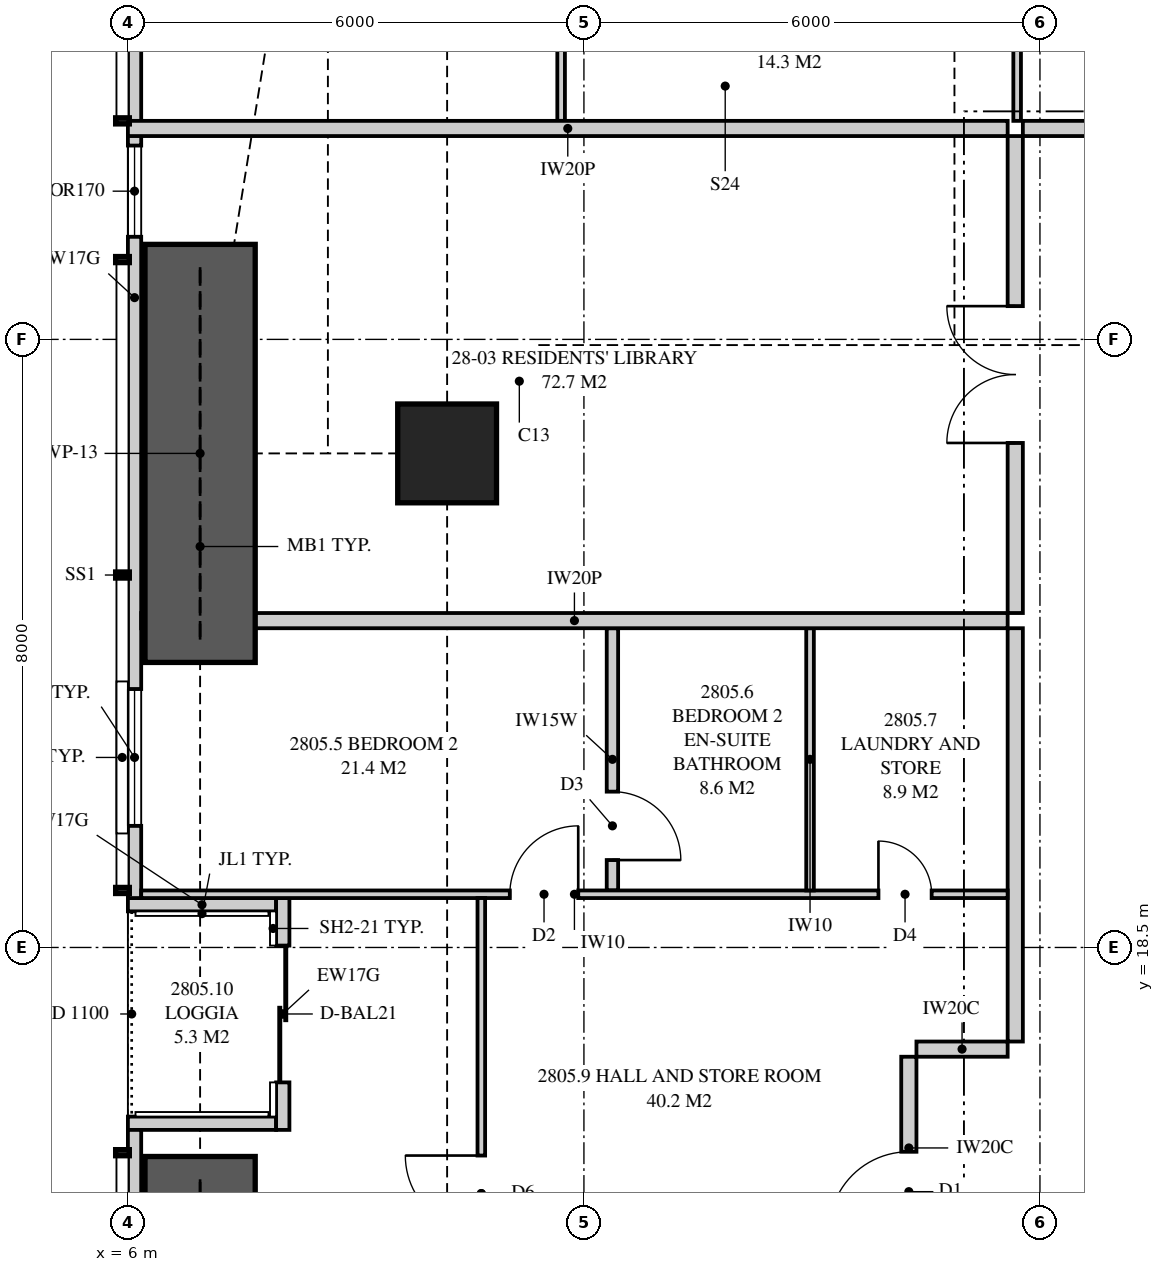
"""IFC4 building model, lengths in metres.
Left out: names, types, materials, properties, quantities, classifications, styles, units other than length and angle.
Written with IfcOpenShell. Run it as: python <this file> out.ifc"""

import sys

from ifc_helpers import new_model, si_unit, direction, frame, frame_2d, origin, origin_2d, place, context, subcontext, project, spatial, polyline, rectangle, outline, extrude, element, fill, save


model = new_model("IFC4")
c1 = context("Model", 3, precision=1e-05, world=origin(), true_north=direction((0.0, 1.0)))
c2 = subcontext(c1, "Body", "Model", "MODEL_VIEW")
j1 = project(units=[si_unit("LENGTHUNIT", "METRE"), si_unit("PLANEANGLEUNIT", "RADIAN")], contexts=[c1])
p1 = place(None, origin())
s1 = spatial("IfcSite", under=j1, at=p1, CompositionType="ELEMENT")
p2 = place(p1, origin())
s2 = spatial("IfcBuilding", under=s1, at=p2, CompositionType="ELEMENT")
p3 = place(p2, frame((0.0, 0.0, 104.85)))
s3 = spatial("IfcBuildingStorey", under=s2, at=p3, CompositionType="ELEMENT", Elevation=104.85)
p4 = place(p3, frame((10.2, 25.0, 0.0), z_axis=(0.0, 0.0, 1.0), x_axis=(1.0, 0.0, 0.0)))
e1 = element("IfcColumn", 1, at=p4, inside=s3, PredefinedType="COLUMN", context=c2, shape_type="SweptSolid", body=[
    extrude(rectangle(XDim=1.3, YDim=1.3, at=origin_2d()), origin(), (0.0, 0.0, 1.0), 3.35),
])
p5 = place(p3, frame((6.087, 34.949, 0.0), z_axis=(0.0, 0.0, 1.0), x_axis=(0.0, -1.0, 0.0)))
e2 = element("IfcWall", 2, at=p5, inside=s3, PredefinedType="SOLIDWALL", context=c2, shape_type="SweptSolid", body=[
    extrude(outline(polyline([(0.0, 0.0), (15.799, 0.0), (15.799, 2.15), (9.949, 2.15), (9.949, 3.11), (9.823, 3.11), (9.823, 2.15), (9.73, 2.15), (9.73, 3.11), (0.0, 3.11), (0.0, 0.0)])), frame((0.0, 0.087, 0.0), z_axis=(0.0, -1.0, 0.0), x_axis=(1.0, 0.0, 0.0)), (0.0, 0.0, 1.0), 0.175),
])
p6 = place(p5, frame((2.724, 0.0, 0.4)))
e3 = element("IfcOpeningElement", 3, at=p6, cuts=e2, PredefinedType="OPENING", context=c2, shape_type="SweptSolid", body=[
    extrude(rectangle(XDim=1.8, YDim=1.7, at=frame_2d((0.9, 0.85))), frame((0.0, 0.097, 0.0), z_axis=(0.0, -1.0, 0.0), x_axis=(1.0, 0.0, 0.0)), (0.0, 0.0, 1.0), 0.195),
])
p7 = place(p5, frame((5.899, 0.0, 0.4)))
e4 = element("IfcOpeningElement", 4, at=p7, cuts=e2, PredefinedType="OPENING", context=c2, shape_type="SweptSolid", body=[
    extrude(rectangle(XDim=1.2, YDim=1.7, at=frame_2d((0.6, 0.85))), frame((0.0, 0.097, 0.0), z_axis=(0.0, -1.0, 0.0), x_axis=(1.0, 0.0, 0.0)), (0.0, 0.0, 1.0), 0.195),
])
p8 = place(p5, frame((13.049, 0.0, 0.4)))
e5 = element("IfcOpeningElement", 5, at=p8, cuts=e2, PredefinedType="OPENING", context=c2, shape_type="SweptSolid", body=[
    extrude(rectangle(XDim=1.8, YDim=1.7, at=frame_2d((0.9, 0.85))), frame((0.0, 0.097, 0.0), z_axis=(0.0, -1.0, 0.0), x_axis=(1.0, 0.0, 0.0)), (0.0, 0.0, 1.0), 0.195),
])
p9 = place(p3, frame((6.087, 16.1, 0.0), z_axis=(0.0, 0.0, 1.0), x_axis=(0.0, -1.0, 0.0)))
e6 = element("IfcWall", 6, at=p9, inside=s3, PredefinedType="SOLIDWALL", context=c2, shape_type="SweptSolid", body=[
    extrude(outline(polyline([(0.0, 0.0), (13.049, 0.0), (13.049, 3.11), (3.319, 3.11), (3.319, 2.15), (3.226, 2.15), (3.226, 3.11), (3.1, 3.11), (3.1, 2.15), (0.0, 2.15), (0.0, 0.0)])), frame((0.0, 0.087, 0.0), z_axis=(0.0, -1.0, 0.0), x_axis=(1.0, 0.0, 0.0)), (0.0, 0.0, 1.0), 0.175),
])
p10 = place(p9, frame((5.975, 0.0, 0.4)))
e7 = element("IfcOpeningElement", 7, at=p10, cuts=e6, PredefinedType="OPENING", context=c2, shape_type="SweptSolid", body=[
    extrude(rectangle(XDim=1.8, YDim=1.7, at=frame_2d((0.9, 0.85))), frame((0.0, 0.097, 0.0), z_axis=(0.0, -1.0, 0.0), x_axis=(1.0, 0.0, 0.0)), (0.0, 0.0, 1.0), 0.195),
])
p11 = place(p9, frame((9.025, 0.0, 0.4)))
e8 = element("IfcOpeningElement", 8, at=p11, cuts=e6, PredefinedType="OPENING", context=c2, shape_type="SweptSolid", body=[
    extrude(rectangle(XDim=1.8, YDim=1.7, at=frame_2d((0.9, 0.85))), frame((0.0, 0.097, 0.0), z_axis=(0.0, -1.0, 0.0), x_axis=(1.0, 0.0, 0.0)), (0.0, 0.0, 1.0), 0.195),
])
p12 = place(p3, frame((8.038, 19.15, 0.0), z_axis=(0.0, 0.0, 1.0), x_axis=(0.0, -1.0, 0.0)))
e9 = element("IfcWall", 9, at=p12, inside=s3, PredefinedType="SOLIDWALL", context=c2, shape_type="SweptSolid", body=[
    extrude(rectangle(XDim=3.05, YDim=0.175, at=frame_2d((1.525, 0.0))), origin(), (0.0, 0.0, 1.0), 3.11),
])
p13 = place(p12, frame((0.625, 0.0, 0.0)))
e10 = element("IfcOpeningElement", 10, at=p13, cuts=e9, PredefinedType="OPENING", context=c2, shape_type="SweptSolid", body=[
    extrude(rectangle(XDim=1.8, YDim=2.1, at=frame_2d((0.9, 1.05))), frame((0.0, 0.097, 0.0), z_axis=(0.0, -1.0, 0.0), x_axis=(1.0, 0.0, 0.0)), (0.0, 0.0, 1.0), 0.195),
])
for number, where, z_axis, x_axis in (
    (11, (6.0, 19.062, 0.0), (0.0, 0.0, 1.0), (1.0, 0.0, 0.0)),
    (12, (6.0, 16.188, 0.0), (0.0, 0.0, 1.0), (1.0, 0.0, 0.0)),
):
    element("IfcWall", number, at=place(p3, frame(where, z_axis=z_axis, x_axis=x_axis)), inside=s3, PredefinedType="SOLIDWALL", context=c2, shape_type="SweptSolid", body=[
        extrude(outline(polyline([(0.0, 0.0), (1.95, 0.0), (1.95, 3.11), (1.75, 3.11), (1.75, 2.15), (0.15, 2.15), (0.15, 3.11), (0.0, 3.11), (0.0, 0.0)])), frame((0.0, 0.087, 0.0), z_axis=(0.0, -1.0, 0.0), x_axis=(1.0, 0.0, 0.0)), (0.0, 0.0, 1.0), 0.175),
    ])
p14 = place(p3, frame((17.775, 29.275, 0.0), z_axis=(0.0, 0.0, 1.0), x_axis=(1.0, 0.0, 0.0)))
e13 = element("IfcWall", 13, at=p14, inside=s3, PredefinedType="PARTITIONING", context=c2, shape_type="SweptSolid", body=[
    extrude(rectangle(XDim=9.188, YDim=0.2, at=frame_2d((4.594, 0.0))), origin(), (0.0, 0.0, 1.0), 3.11),
])
p15 = place(p14, frame((5.05, 0.0, 0.0)))
e14 = element("IfcOpeningElement", 14, at=p15, cuts=e13, PredefinedType="OPENING", context=c2, shape_type="SweptSolid", body=[
    extrude(rectangle(XDim=1.05, YDim=2.2, at=frame_2d((0.525, 1.1))), frame((0.0, 0.11, 0.0), z_axis=(0.0, -1.0, 0.0), x_axis=(1.0, 0.0, 0.0)), (0.0, 0.0, 1.0), 0.22),
])
p16 = place(p3, frame((11.7, 37.825, 0.0), z_axis=(0.0, 0.0, 1.0), x_axis=(0.0, -1.0, 0.0)))
e15 = element("IfcWall", 15, at=p16, inside=s3, PredefinedType="PARTITIONING", context=c2, shape_type="SweptSolid", body=[
    extrude(outline(polyline([(0.0, 0.0), (8.45, 0.0), (8.45, 3.11), (2.708, 3.11), (2.708, 2.15), (0.953, 2.15), (0.953, 3.11), (0.0, 3.11), (0.0, 0.0)])), frame((0.0, 0.05, 0.0), z_axis=(0.0, -1.0, 0.0), x_axis=(1.0, 0.0, 0.0)), (0.0, 0.0, 1.0), 0.1),
])
p17 = place(p16, frame((2.701, 0.0, 0.0)))
e16 = element("IfcOpeningElement", 16, at=p17, cuts=e15, PredefinedType="OPENING", context=c2, shape_type="SweptSolid", body=[
    extrude(rectangle(XDim=0.9, YDim=2.1, at=frame_2d((0.45, 1.05))), frame((0.0, 0.06, 0.0), z_axis=(0.0, -1.0, 0.0), x_axis=(1.0, 0.0, 0.0)), (0.0, 0.0, 1.0), 0.12),
])
p18 = place(p16, frame((6.025, 0.0, 0.0)))
e17 = element("IfcOpeningElement", 17, at=p18, cuts=e15, PredefinedType="OPENING", context=c2, shape_type="SweptSolid", body=[
    extrude(rectangle(XDim=0.9, YDim=2.1, at=frame_2d((0.45, 1.05))), frame((0.0, 0.06, 0.0), z_axis=(0.0, -1.0, 0.0), x_axis=(1.0, 0.0, 0.0)), (0.0, 0.0, 1.0), 0.12),
])
p19 = place(p3, frame((17.7, 37.825, 0.0), z_axis=(0.0, 0.0, 1.0), x_axis=(0.0, -1.0, 0.0)))
e18 = element("IfcWall", 18, at=p19, inside=s3, PredefinedType="PARTITIONING", context=c2, shape_type="SweptSolid", body=[
    extrude(outline(polyline([(1.635, 2.15), (0.0, 2.15), (0.0, 0.0), (8.45, 0.0), (8.45, 3.11), (1.635, 3.11), (1.635, 2.15)]), holes=[polyline([(1.021, 0.116), (0.529, 0.116), (0.529, 0.906), (1.021, 0.906), (1.021, 0.116)]), polyline([(1.021, 1.244), (0.529, 1.244), (0.529, 2.034), (1.021, 2.034), (1.021, 1.244)])]), frame((0.0, 0.05, 0.0), z_axis=(0.0, -1.0, 0.0), x_axis=(1.0, 0.0, 0.0)), (0.0, 0.0, 1.0), 0.1),
])
p20 = place(p19, frame((4.6, 0.0, 0.0)))
e19 = element("IfcOpeningElement", 19, at=p20, cuts=e18, PredefinedType="OPENING", context=c2, shape_type="SweptSolid", body=[
    extrude(rectangle(XDim=0.9, YDim=2.1, at=frame_2d((0.45, 1.05))), frame((0.0, 0.06, 0.0), z_axis=(0.0, -1.0, 0.0), x_axis=(1.0, 0.0, 0.0)), (0.0, 0.0, 1.0), 0.12),
])
p21 = place(p3, frame((6.0, 29.275, 0.0), z_axis=(0.0, 0.0, 1.0), x_axis=(1.0, 0.0, 0.0)))
e20 = element("IfcWall", 20, at=p21, inside=s3, PredefinedType="PARTITIONING", context=c2, shape_type="SweptSolid", body=[
    extrude(outline(polyline([(0.0, 0.0), (11.575, 0.0), (11.575, 3.11), (11.212, 3.11), (11.212, 2.541), (10.538, 2.541), (10.538, 3.11), (5.51, 3.11), (5.51, 2.51), (2.969, 2.51), (2.969, 2.541), (2.565, 2.541), (2.565, 2.15), (0.721, 2.15), (0.721, 3.11), (0.0, 3.11), (0.0, 0.0)])), frame((0.0, 0.1, 0.0), z_axis=(0.0, -1.0, 0.0), x_axis=(1.0, 0.0, 0.0)), (0.0, 0.0, 1.0), 0.2),
])
p22 = place(p3, frame((6.175, 22.8, 0.0), z_axis=(0.0, 0.0, 1.0), x_axis=(1.0, 0.0, 0.0)))
e21 = element("IfcWall", 21, at=p22, inside=s3, PredefinedType="PARTITIONING", context=c2, shape_type="SweptSolid", body=[
    extrude(outline(polyline([(0.0, 0.0), (11.4, 0.0), (11.4, 3.11), (5.335, 3.11), (5.335, 2.51), (2.715, 2.51), (2.715, 3.11), (1.685, 3.11), (1.685, 2.15), (0.0, 2.15), (0.0, 0.0)])), frame((0.0, 0.1, 0.0), z_axis=(0.0, -1.0, 0.0), x_axis=(1.0, 0.0, 0.0)), (0.0, 0.0, 1.0), 0.2),
])
p23 = place(p3, frame((6.175, 19.2, 0.0), z_axis=(0.0, 0.0, 1.0), x_axis=(1.0, 0.0, 0.0)))
e22 = element("IfcWall", 22, at=p23, inside=s3, PredefinedType="PARTITIONING", context=c2, shape_type="SweptSolid", body=[
    extrude(outline(polyline([(0.0, 0.0), (11.4, 0.0), (11.4, 3.11), (5.285, 3.11), (5.285, 2.51), (2.765, 2.51), (2.765, 3.11), (1.635, 3.11), (1.635, 2.15), (0.0, 2.15), (0.0, 3.11), (0.0, 0.0)])), frame((0.0, 0.05, 0.0), z_axis=(0.0, -1.0, 0.0), x_axis=(1.0, 0.0, 0.0)), (0.0, 0.0, 1.0), 0.1),
])
p24 = place(p23, frame((4.85, 0.0, 0.0)))
e23 = element("IfcOpeningElement", 23, at=p24, cuts=e22, PredefinedType="OPENING", context=c2, shape_type="SweptSolid", body=[
    extrude(rectangle(XDim=0.9, YDim=2.1, at=frame_2d((0.45, 1.05))), frame((0.0, 0.06, 0.0), z_axis=(0.0, -1.0, 0.0), x_axis=(1.0, 0.0, 0.0)), (0.0, 0.0, 1.0), 0.12),
])
p25 = place(p23, frame((9.7, 0.0, 0.0)))
e24 = element("IfcOpeningElement", 24, at=p25, cuts=e22, PredefinedType="OPENING", context=c2, shape_type="SweptSolid", body=[
    extrude(rectangle(XDim=0.7, YDim=2.1, at=frame_2d((0.35, 1.05))), frame((0.0, 0.06, 0.0), z_axis=(0.0, -1.0, 0.0), x_axis=(1.0, 0.0, 0.0)), (0.0, 0.0, 1.0), 0.12),
])
p26 = place(p3, frame((12.375, 19.25, 0.0), z_axis=(0.0, 0.0, 1.0), x_axis=(0.0, 1.0, 0.0)))
e25 = element("IfcWall", 25, at=p26, inside=s3, PredefinedType="PLUMBINGWALL", context=c2, shape_type="SweptSolid", body=[
    extrude(rectangle(XDim=3.45, YDim=0.15, at=frame_2d((1.725, 0.0))), origin(), (0.0, 0.0, 1.0), 3.11),
])
p27 = place(p26, frame((0.4, 0.0, 0.0)))
e26 = element("IfcOpeningElement", 26, at=p27, cuts=e25, PredefinedType="OPENING", context=c2, shape_type="SweptSolid", body=[
    extrude(rectangle(XDim=0.9, YDim=2.1, at=frame_2d((0.45, 1.05))), frame((0.0, 0.085, 0.0), z_axis=(0.0, -1.0, 0.0), x_axis=(1.0, 0.0, 0.0)), (0.0, 0.0, 1.0), 0.17),
])
p28 = place(p3, frame((14.975, 19.25, 0.0), z_axis=(0.0, 0.0, 1.0), x_axis=(0.0, 1.0, 0.0)))
e27 = element("IfcWall", 27, at=p28, inside=s3, PredefinedType="PARTITIONING", context=c2, shape_type="SweptSolid", body=[
    extrude(rectangle(XDim=3.45, YDim=0.1, at=frame_2d((1.725, 0.0))), origin(), (0.0, 0.0, 1.0), 3.11),
])
p29 = place(p3, frame((10.65, 11.375, 0.0), z_axis=(0.0, 0.0, 1.0), x_axis=(0.0, 1.0, 0.0)))
e28 = element("IfcWall", 28, at=p29, inside=s3, PredefinedType="PARTITIONING", context=c2, shape_type="SweptSolid", body=[
    extrude(outline(polyline([(0.0, 0.0), (7.775, 0.0), (7.775, 3.11), (7.775, 2.51), (1.685, 2.51), (0.0, 2.51), (0.0, 3.11), (0.0, 0.0)])), frame((0.0, 0.05, 0.0), z_axis=(0.0, -1.0, 0.0), x_axis=(1.0, 0.0, 0.0)), (0.0, 0.0, 1.0), 0.1),
])
p30 = place(p29, frame((3.387, 0.0, 0.0)))
e29 = element("IfcOpeningElement", 29, at=p30, cuts=e28, PredefinedType="OPENING", context=c2, shape_type="SweptSolid", body=[
    extrude(rectangle(XDim=1.0, YDim=2.1, at=frame_2d((0.5, 1.05))), frame((0.0, 0.06, 0.0), z_axis=(0.0, -1.0, 0.0), x_axis=(1.0, 0.0, 0.0)), (0.0, 0.0, 1.0), 0.12),
])
p31 = place(p3, frame((17.675, 22.9, 0.0), z_axis=(0.0, 0.0, 1.0), x_axis=(0.0, 1.0, 0.0)))
e30 = element("IfcWall", 30, at=p31, inside=s3, PredefinedType="PARTITIONING", context=c2, shape_type="SweptSolid", body=[
    extrude(outline(polyline([(0.0, 0.0), (6.275, 0.0), (6.275, 3.11), (3.862, 3.11), (3.862, 2.541), (3.188, 2.541), (3.188, 3.11), (0.0, 3.11), (0.0, 0.0)])), frame((0.0, 0.1, 0.0), z_axis=(0.0, -1.0, 0.0), x_axis=(1.0, 0.0, 0.0)), (0.0, 0.0, 1.0), 0.2),
])
p32 = place(p31, frame((2.238, 0.0, 0.0)))
e31 = element("IfcOpeningElement", 31, at=p32, cuts=e30, PredefinedType="OPENING", context=c2, shape_type="SweptSolid", body=[
    extrude(rectangle(XDim=1.8, YDim=2.1, at=frame_2d((0.9, 1.05))), frame((0.0, 0.11, 0.0), z_axis=(0.0, -1.0, 0.0), x_axis=(1.0, 0.0, 0.0)), (0.0, 0.0, 1.0), 0.22),
])
p33 = place(p3, frame((17.675, 17.262, 0.0), z_axis=(0.0, 0.0, 1.0), x_axis=(0.0, 1.0, 0.0)))
e32 = element("IfcWall", 32, at=p33, inside=s3, PredefinedType="PARTITIONING", context=c2, shape_type="SweptSolid", body=[
    extrude(rectangle(XDim=5.438, YDim=0.2, at=frame_2d((2.719, 0.0))), origin(), (0.0, 0.0, 1.0), 3.11),
])
p34 = place(p3, frame((16.275, 14.663, 0.0), z_axis=(0.0, 0.0, 1.0), x_axis=(0.0, 1.0, 0.0)))
e33 = element("IfcWall", 33, at=p34, inside=s3, PredefinedType="PARTITIONING", context=c2, shape_type="SweptSolid", body=[
    extrude(rectangle(XDim=2.4, YDim=0.2, at=frame_2d((1.2, 0.0))), origin(), (0.0, 0.0, 1.0), 3.11),
])
p35 = place(p34, frame((0.1, 0.0, 0.0)))
e34 = element("IfcOpeningElement", 34, at=p35, cuts=e33, PredefinedType="OPENING", context=c2, shape_type="SweptSolid", body=[
    extrude(rectangle(XDim=1.05, YDim=2.2, at=frame_2d((0.525, 1.1))), frame((0.0, 0.11, 0.0), z_axis=(0.0, -1.0, 0.0), x_axis=(1.0, 0.0, 0.0)), (0.0, 0.0, 1.0), 0.22),
])
p36 = place(p3, frame((17.575, 17.163, 0.0), z_axis=(0.0, 0.0, 1.0), x_axis=(-1.0, 0.0, 0.0)))
e35 = element("IfcWall", 35, at=p36, inside=s3, PredefinedType="PARTITIONING", context=c2, shape_type="SweptSolid", body=[
    extrude(rectangle(XDim=1.2, YDim=0.2, at=frame_2d((0.6, 0.0))), origin(), (0.0, 0.0, 1.0), 3.11),
])
for number, where, z_axis, x_axis in (
    (36, (6.95, 22.25, 0.0), (0.0, 0.0, 1.0), (0.0, 1.0, 0.0)),
    (37, (6.95, 10.25, 0.0), (0.0, 0.0, 1.0), (0.0, 1.0, 0.0)),
):
    element("IfcWall", number, at=place(p3, frame(where, z_axis=z_axis, x_axis=x_axis)), inside=s3, PredefinedType="SHEAR", context=c2, shape_type="SweptSolid", body=[
        extrude(rectangle(XDim=5.5, YDim=1.45, at=frame_2d((2.75, 0.0))), origin(), (0.0, 0.0, 1.0), 3.35),
    ])
p37 = place(p7, origin())
e38 = element("IfcWindow", 38, at=p37, inside=s3, PartitioningType="SINGLE_PANEL", PredefinedType="WINDOW", context=c2, shape_type="SweptSolid", body=[
    extrude(rectangle(XDim=1.2, YDim=1.7, at=frame_2d((0.6, 0.85))), frame((0.0, 0.03, 0.0), z_axis=(0.0, -1.0, 0.0), x_axis=(1.0, 0.0, 0.0)), (0.0, 0.0, 1.0), 0.06),
])
fill(e4, e38)
p38 = place(p8, origin())
e39 = element("IfcWindow", 39, at=p38, inside=s3, PartitioningType="SINGLE_PANEL", PredefinedType="WINDOW", context=c2, shape_type="SweptSolid", body=[
    extrude(rectangle(XDim=1.8, YDim=1.7, at=frame_2d((0.9, 0.85))), frame((0.0, 0.03, 0.0), z_axis=(0.0, -1.0, 0.0), x_axis=(1.0, 0.0, 0.0)), (0.0, 0.0, 1.0), 0.06),
])
fill(e5, e39)
p39 = place(p13, origin())
e40 = element("IfcDoor", 40, at=p39, inside=s3, OperationType="SLIDING_TO_LEFT", PredefinedType="DOOR", context=c2, shape_type="SweptSolid", body=[
    extrude(rectangle(XDim=1.8, YDim=2.1, at=frame_2d((0.9, 1.05))), frame((0.0, 0.025, 0.0), z_axis=(0.0, -1.0, 0.0), x_axis=(1.0, 0.0, 0.0)), (0.0, 0.0, 1.0), 0.05),
])
fill(e10, e40)
p40 = place(p35, origin())
e41 = element("IfcDoor", 41, at=p40, inside=s3, OperationType="SINGLE_SWING_LEFT", PredefinedType="DOOR", context=c2, shape_type="SweptSolid", body=[
    extrude(rectangle(XDim=1.05, YDim=2.2, at=frame_2d((0.525, 1.1))), frame((0.0, 0.025, 0.0), z_axis=(0.0, -1.0, 0.0), x_axis=(1.0, 0.0, 0.0)), (0.0, 0.0, 1.0), 0.05),
])
fill(e34, e41)
p41 = place(p24, origin())
e42 = element("IfcDoor", 42, at=p41, inside=s3, OperationType="SINGLE_SWING_RIGHT", PredefinedType="DOOR", context=c2, shape_type="SweptSolid", body=[
    extrude(rectangle(XDim=0.9, YDim=2.1, at=frame_2d((0.45, 1.05))), frame((0.0, 0.025, 0.0), z_axis=(0.0, -1.0, 0.0), x_axis=(1.0, 0.0, 0.0)), (0.0, 0.0, 1.0), 0.05),
])
fill(e23, e42)
p42 = place(p27, frame((0.9, 0.0, 0.0), z_axis=(0.0, 0.0, 1.0), x_axis=(-1.0, 0.0, 0.0)))
e43 = element("IfcDoor", 43, at=p42, inside=s3, OperationType="SINGLE_SWING_RIGHT", PredefinedType="DOOR", context=c2, shape_type="SweptSolid", body=[
    extrude(rectangle(XDim=0.9, YDim=2.1, at=frame_2d((0.45, 1.05))), frame((0.0, 0.025, 0.0), z_axis=(0.0, -1.0, 0.0), x_axis=(1.0, 0.0, 0.0)), (0.0, 0.0, 1.0), 0.05),
])
fill(e26, e43)
p43 = place(p25, origin())
e44 = element("IfcDoor", 44, at=p43, inside=s3, OperationType="SINGLE_SWING_LEFT", PredefinedType="DOOR", context=c2, shape_type="SweptSolid", body=[
    extrude(rectangle(XDim=0.7, YDim=2.1, at=frame_2d((0.35, 1.05))), frame((0.0, 0.025, 0.0), z_axis=(0.0, -1.0, 0.0), x_axis=(1.0, 0.0, 0.0)), (0.0, 0.0, 1.0), 0.05),
])
fill(e24, e44)
p44 = place(p30, origin())
e45 = element("IfcDoor", 45, at=p44, inside=s3, OperationType="SINGLE_SWING_RIGHT", PredefinedType="DOOR", context=c2, shape_type="SweptSolid", body=[
    extrude(rectangle(XDim=1.0, YDim=2.1, at=frame_2d((0.5, 1.05))), frame((0.0, 0.025, 0.0), z_axis=(0.0, -1.0, 0.0), x_axis=(1.0, 0.0, 0.0)), (0.0, 0.0, 1.0), 0.05),
])
fill(e29, e45)
p45 = place(p32, origin())
e46 = element("IfcDoor", 46, at=p45, inside=s3, OperationType="DOUBLE_DOOR_SINGLE_SWING", PredefinedType="DOOR", context=c2, shape_type="SweptSolid", body=[
    extrude(rectangle(XDim=1.8, YDim=2.1, at=frame_2d((0.9, 1.05))), frame((0.0, 0.025, 0.0), z_axis=(0.0, -1.0, 0.0), x_axis=(1.0, 0.0, 0.0)), (0.0, 0.0, 1.0), 0.05),
])
fill(e31, e46)
save(model, sys.argv[1])
